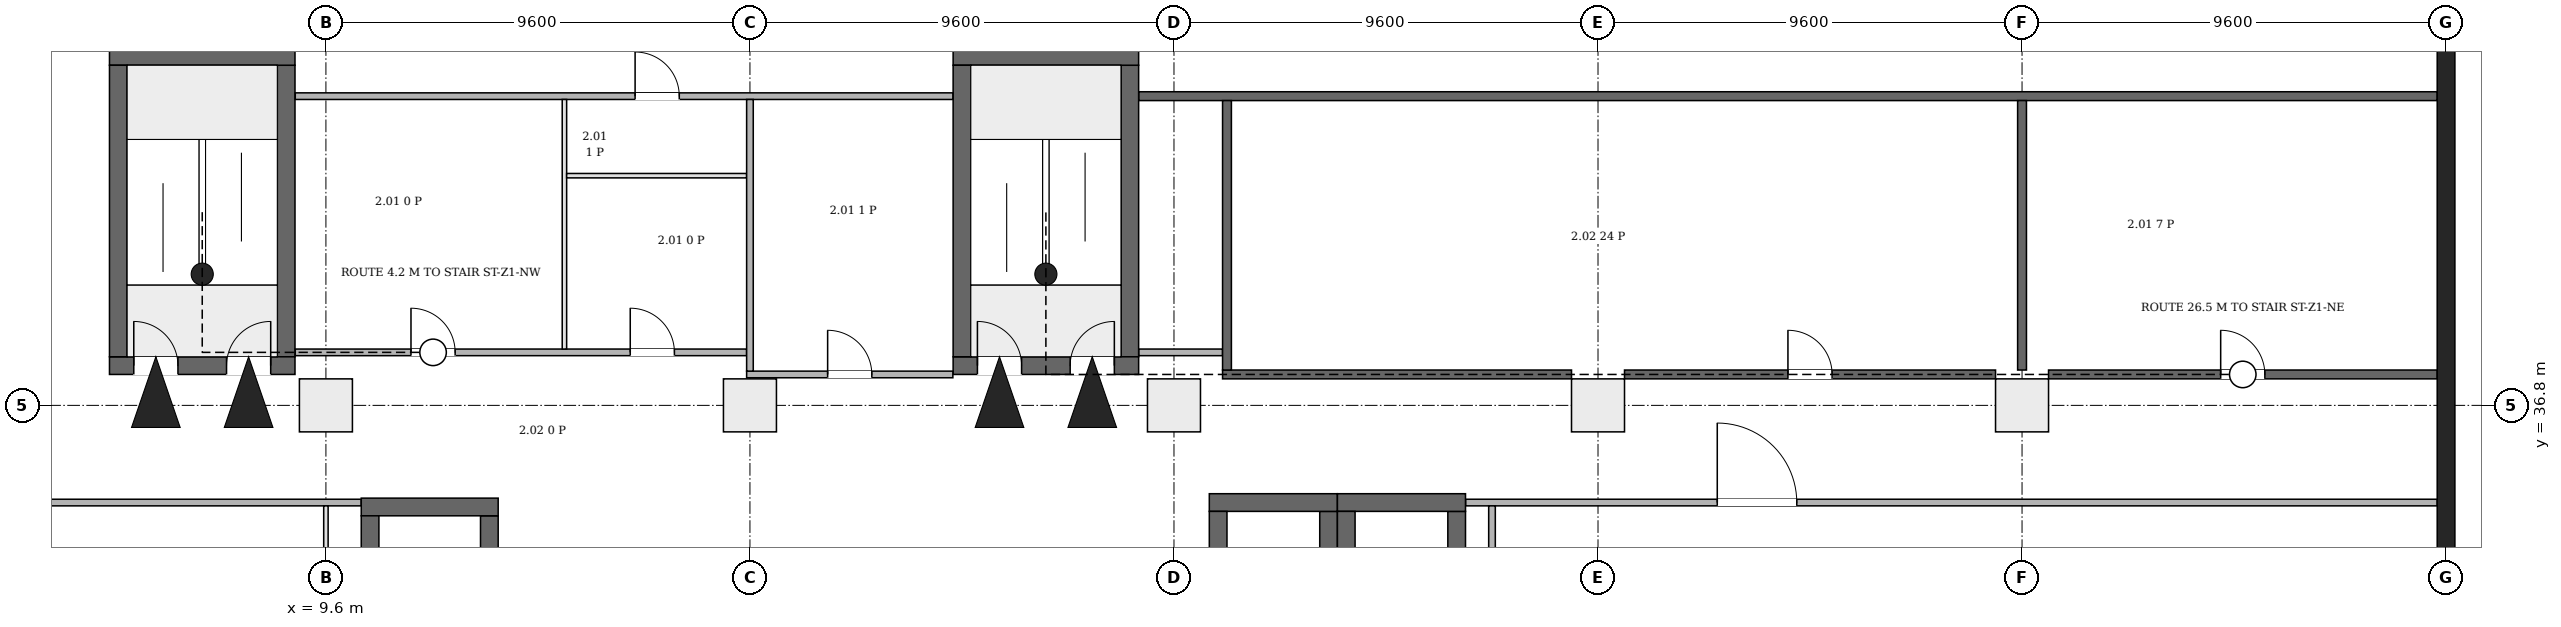
"""IFC4 building model, lengths in metres.
Left out: names, types, materials, properties, quantities, classifications, styles, units other than length and angle.
Written with IfcOpenShell. Run it as: python <this file> out.ifc"""

import sys

from ifc_helpers import new_model, si_unit, direction, frame, frame_2d, origin, origin_2d, place, context, subcontext, project, spatial, rectangle, extrude, element, fill, save


model = new_model("IFC4")
c1 = context("Model", 3, precision=1e-05, world=origin(), true_north=direction((0.0, 1.0)))
c2 = subcontext(c1, "Body", "Model", "MODEL_VIEW")
j1 = project(units=[si_unit("LENGTHUNIT", "METRE"), si_unit("PLANEANGLEUNIT", "RADIAN")], contexts=[c1])
p1 = place(None, origin())
s1 = spatial("IfcSite", under=j1, at=p1, CompositionType="ELEMENT")
p2 = place(p1, origin())
s2 = spatial("IfcBuilding", under=s1, at=p2, CompositionType="ELEMENT")
p3 = place(p2, frame((0.0, 0.0, 14.2)))
s3 = spatial("IfcBuildingStorey", under=s2, at=p3, CompositionType="ELEMENT", Elevation=14.2)
p4 = place(p3, frame((57.6, -0.2, 0.0), z_axis=(0.0, 0.0, 1.0), x_axis=(0.0, 1.0, 0.0)))
e1 = element("IfcWall", 1, at=p4, inside=s3, PredefinedType="SHEAR", context=c2, shape_type="SweptSolid", body=[
    extrude(rectangle(XDim=46.88, YDim=0.4, at=frame_2d((23.44, 0.0))), origin(), (0.0, 0.0, 1.0), 7.5),
])
p5 = place(p3, frame((4.7, 37.7, 0.0), z_axis=(0.0, 0.0, 1.0), x_axis=(1.0, 0.0, 0.0)))
e2 = element("IfcWall", 2, at=p5, inside=s3, PredefinedType="SHEAR", context=c2, shape_type="SweptSolid", body=[
    extrude(rectangle(XDim=4.2, YDim=0.4, at=frame_2d((2.1, 0.0))), origin(), (0.0, 0.0, 1.0), 7.5),
])
p6 = place(p5, frame((0.55, 0.0, 0.0)))
e3 = element("IfcOpeningElement", 3, at=p6, cuts=e2, PredefinedType="OPENING", context=c2, shape_type="SweptSolid", body=[
    extrude(rectangle(XDim=1.0, YDim=2.1, at=frame_2d((0.5, 1.05))), frame((0.0, 0.21, 0.0), z_axis=(0.0, -1.0, 0.0), x_axis=(1.0, 0.0, 0.0)), (0.0, 0.0, 1.0), 0.42),
])
p7 = place(p5, frame((2.65, 0.0, 0.0)))
e4 = element("IfcOpeningElement", 4, at=p7, cuts=e2, PredefinedType="OPENING", context=c2, shape_type="SweptSolid", body=[
    extrude(rectangle(XDim=1.0, YDim=2.1, at=frame_2d((0.5, 1.05))), frame((0.0, 0.21, 0.0), z_axis=(0.0, -1.0, 0.0), x_axis=(1.0, 0.0, 0.0)), (0.0, 0.0, 1.0), 0.42),
])
p8 = place(p3, frame((4.7, 44.7, 0.0), z_axis=(0.0, 0.0, 1.0), x_axis=(1.0, 0.0, 0.0)))
e5 = element("IfcWall", 5, at=p8, inside=s3, PredefinedType="SHEAR", context=c2, shape_type="SweptSolid", body=[
    extrude(rectangle(XDim=4.2, YDim=0.4, at=frame_2d((2.1, 0.0))), origin(), (0.0, 0.0, 1.0), 7.5),
])
for number, where, z_axis, x_axis in (
    (6, (4.9, 37.9, 0.0), (0.0, 0.0, 1.0), (0.0, 1.0, 0.0)),
    (7, (8.7, 37.9, 0.0), (0.0, 0.0, 1.0), (0.0, 1.0, 0.0)),
):
    element("IfcWall", number, at=place(p3, frame(where, z_axis=z_axis, x_axis=x_axis)), inside=s3, PredefinedType="SHEAR", context=c2, shape_type="SweptSolid", body=[
        extrude(rectangle(XDim=6.6, YDim=0.4, at=frame_2d((3.3, 0.0))), origin(), (0.0, 0.0, 1.0), 7.5),
    ])
p9 = place(p3, frame((23.8, 37.7, 0.0), z_axis=(0.0, 0.0, 1.0), x_axis=(1.0, 0.0, 0.0)))
e8 = element("IfcWall", 8, at=p9, inside=s3, PredefinedType="SHEAR", context=c2, shape_type="SweptSolid", body=[
    extrude(rectangle(XDim=4.2, YDim=0.4, at=frame_2d((2.1, 0.0))), origin(), (0.0, 0.0, 1.0), 7.5),
])
p10 = place(p9, frame((0.55, 0.0, 0.0)))
e9 = element("IfcOpeningElement", 9, at=p10, cuts=e8, PredefinedType="OPENING", context=c2, shape_type="SweptSolid", body=[
    extrude(rectangle(XDim=1.0, YDim=2.1, at=frame_2d((0.5, 1.05))), frame((0.0, 0.21, 0.0), z_axis=(0.0, -1.0, 0.0), x_axis=(1.0, 0.0, 0.0)), (0.0, 0.0, 1.0), 0.42),
])
p11 = place(p9, frame((2.65, 0.0, 0.0)))
e10 = element("IfcOpeningElement", 10, at=p11, cuts=e8, PredefinedType="OPENING", context=c2, shape_type="SweptSolid", body=[
    extrude(rectangle(XDim=1.0, YDim=2.1, at=frame_2d((0.5, 1.05))), frame((0.0, 0.21, 0.0), z_axis=(0.0, -1.0, 0.0), x_axis=(1.0, 0.0, 0.0)), (0.0, 0.0, 1.0), 0.42),
])
p12 = place(p3, frame((23.8, 44.7, 0.0), z_axis=(0.0, 0.0, 1.0), x_axis=(1.0, 0.0, 0.0)))
e11 = element("IfcWall", 11, at=p12, inside=s3, PredefinedType="SHEAR", context=c2, shape_type="SweptSolid", body=[
    extrude(rectangle(XDim=4.2, YDim=0.4, at=frame_2d((2.1, 0.0))), origin(), (0.0, 0.0, 1.0), 7.5),
])
for number, where, z_axis, x_axis in (
    (12, (24.0, 37.9, 0.0), (0.0, 0.0, 1.0), (0.0, 1.0, 0.0)),
    (13, (27.8, 37.9, 0.0), (0.0, 0.0, 1.0), (0.0, 1.0, 0.0)),
):
    element("IfcWall", number, at=place(p3, frame(where, z_axis=z_axis, x_axis=x_axis)), inside=s3, PredefinedType="SHEAR", context=c2, shape_type="SweptSolid", body=[
        extrude(rectangle(XDim=6.6, YDim=0.4, at=frame_2d((3.3, 0.0))), origin(), (0.0, 0.0, 1.0), 7.5),
    ])
p13 = place(p3, frame((10.4, 34.5, 0.0), z_axis=(0.0, 0.0, 1.0), x_axis=(1.0, 0.0, 0.0)))
e14 = element("IfcWall", 14, at=p13, inside=s3, PredefinedType="SHEAR", context=c2, shape_type="SweptSolid", body=[
    extrude(rectangle(XDim=3.1, YDim=0.4, at=frame_2d((1.55, 0.0))), origin(), (0.0, 0.0, 1.0), 7.5),
])
for number, where, z_axis, x_axis in (
    (15, (10.6, 30.9, 0.0), (0.0, 0.0, 1.0), (0.0, 1.0, 0.0)),
    (16, (13.3, 30.9, 0.0), (0.0, 0.0, 1.0), (0.0, 1.0, 0.0)),
):
    element("IfcWall", number, at=place(p3, frame(where, z_axis=z_axis, x_axis=x_axis)), inside=s3, PredefinedType="SHEAR", context=c2, shape_type="SweptSolid", body=[
        extrude(rectangle(XDim=3.4, YDim=0.4, at=frame_2d((1.7, 0.0))), origin(), (0.0, 0.0, 1.0), 7.5),
    ])
p14 = place(p3, frame((29.6, 34.6, 0.0), z_axis=(0.0, 0.0, 1.0), x_axis=(1.0, 0.0, 0.0)))
e17 = element("IfcWall", 17, at=p14, inside=s3, PredefinedType="SHEAR", context=c2, shape_type="SweptSolid", body=[
    extrude(rectangle(XDim=2.9, YDim=0.4, at=frame_2d((1.45, 0.0))), origin(), (0.0, 0.0, 1.0), 7.5),
])
for number, where, z_axis, x_axis in (
    (18, (29.8, 31.4, 0.0), (0.0, 0.0, 1.0), (0.0, 1.0, 0.0)),
    (19, (32.3, 31.4, 0.0), (0.0, 0.0, 1.0), (0.0, 1.0, 0.0)),
):
    element("IfcWall", number, at=place(p3, frame(where, z_axis=z_axis, x_axis=x_axis)), inside=s3, PredefinedType="SHEAR", context=c2, shape_type="SweptSolid", body=[
        extrude(rectangle(XDim=3.0, YDim=0.4, at=frame_2d((1.5, 0.0))), origin(), (0.0, 0.0, 1.0), 7.5),
    ])
p15 = place(p3, frame((32.5, 34.6, 0.0), z_axis=(0.0, 0.0, 1.0), x_axis=(1.0, 0.0, 0.0)))
e20 = element("IfcWall", 20, at=p15, inside=s3, PredefinedType="SHEAR", context=c2, shape_type="SweptSolid", body=[
    extrude(rectangle(XDim=2.9, YDim=0.4, at=frame_2d((1.45, 0.0))), origin(), (0.0, 0.0, 1.0), 7.5),
])
for number, where, z_axis, x_axis in (
    (21, (32.7, 31.4, 0.0), (0.0, 0.0, 1.0), (0.0, 1.0, 0.0)),
    (22, (35.2, 31.4, 0.0), (0.0, 0.0, 1.0), (0.0, 1.0, 0.0)),
):
    element("IfcWall", number, at=place(p3, frame(where, z_axis=z_axis, x_axis=x_axis)), inside=s3, PredefinedType="SHEAR", context=c2, shape_type="SweptSolid", body=[
        extrude(rectangle(XDim=3.0, YDim=0.4, at=frame_2d((1.5, 0.0))), origin(), (0.0, 0.0, 1.0), 7.5),
    ])
for number, where, z_axis, x_axis in (
    (23, (9.6, 36.8, 0.0), (0.0, 0.0, 1.0), (1.0, 0.0, 0.0)),
    (24, (19.2, 36.8, 0.0), (0.0, 0.0, 1.0), (1.0, 0.0, 0.0)),
    (25, (28.8, 36.8, 0.0), (0.0, 0.0, 1.0), (1.0, 0.0, 0.0)),
    (26, (38.4, 36.8, 0.0), (0.0, 0.0, 1.0), (1.0, 0.0, 0.0)),
    (27, (48.0, 36.8, 0.0), (0.0, 0.0, 1.0), (1.0, 0.0, 0.0)),
):
    element("IfcColumn", number, at=place(p3, frame(where, z_axis=z_axis, x_axis=x_axis)), inside=s3, PredefinedType="COLUMN", context=c2, shape_type="SweptSolid", body=[
        extrude(rectangle(XDim=1.2, YDim=1.2, at=origin_2d()), origin(), (0.0, 0.0, 1.0), 7.5),
    ])
p16 = place(p3, frame((2.706, 34.6, 0.0), z_axis=(0.0, 0.0, 1.0), x_axis=(1.0, 0.0, 0.0)))
e28 = element("IfcWall", 28, at=p16, inside=s3, PredefinedType="PARTITIONING", context=c2, shape_type="SweptSolid", body=[
    extrude(rectangle(XDim=7.688, YDim=0.15, at=frame_2d((3.844, 0.0))), origin(), (0.0, 0.0, 1.0), 7.15),
])
p17 = place(p3, frame((8.906, 38.0, 0.0), z_axis=(0.0, 0.0, 1.0), x_axis=(1.0, 0.0, 0.0)))
e29 = element("IfcWall", 29, at=p17, inside=s3, PredefinedType="PARTITIONING", context=c2, shape_type="SweptSolid", body=[
    extrude(rectangle(XDim=10.219, YDim=0.15, at=frame_2d((5.109, 0.0))), origin(), (0.0, 0.0, 1.0), 7.15),
])
p18 = place(p17, frame((2.62, 0.0, 0.0)))
e30 = element("IfcOpeningElement", 30, at=p18, cuts=e29, PredefinedType="OPENING", context=c2, shape_type="SweptSolid", body=[
    extrude(rectangle(XDim=1.0, YDim=2.1, at=frame_2d((0.5, 1.05))), frame((0.0, 0.085, 0.0), z_axis=(0.0, -1.0, 0.0), x_axis=(1.0, 0.0, 0.0)), (0.0, 0.0, 1.0), 0.17),
])
p19 = place(p17, frame((7.584, 0.0, 0.0)))
e31 = element("IfcOpeningElement", 31, at=p19, cuts=e29, PredefinedType="OPENING", context=c2, shape_type="SweptSolid", body=[
    extrude(rectangle(XDim=1.0, YDim=2.1, at=frame_2d((0.5, 1.05))), frame((0.0, 0.085, 0.0), z_axis=(0.0, -1.0, 0.0), x_axis=(1.0, 0.0, 0.0)), (0.0, 0.0, 1.0), 0.17),
])
p20 = place(p3, frame((8.906, 43.8, 0.0), z_axis=(0.0, 0.0, 1.0), x_axis=(1.0, 0.0, 0.0)))
e32 = element("IfcWall", 32, at=p20, inside=s3, PredefinedType="PARTITIONING", context=c2, shape_type="SweptSolid", body=[
    extrude(rectangle(XDim=14.888, YDim=0.15, at=frame_2d((7.444, 0.0))), origin(), (0.0, 0.0, 1.0), 7.15),
])
p21 = place(p20, frame((7.694, 0.0, 0.0)))
e33 = element("IfcOpeningElement", 33, at=p21, cuts=e32, PredefinedType="OPENING", context=c2, shape_type="SweptSolid", body=[
    extrude(rectangle(XDim=1.0, YDim=2.1, at=frame_2d((0.5, 1.05))), frame((0.0, 0.085, 0.0), z_axis=(0.0, -1.0, 0.0), x_axis=(1.0, 0.0, 0.0)), (0.0, 0.0, 1.0), 0.17),
])
p22 = place(p3, frame((9.6, 31.075, 0.0), z_axis=(0.0, 0.0, 1.0), x_axis=(0.0, 1.0, 0.0)))
e34 = element("IfcWall", 34, at=p22, inside=s3, PredefinedType="PARTITIONING", context=c2, shape_type="SweptSolid", body=[
    extrude(rectangle(XDim=3.45, YDim=0.1, at=frame_2d((1.725, 0.0))), origin(), (0.0, 0.0, 1.0), 6.75),
])
p23 = place(p3, frame((15.0, 38.075, 0.0), z_axis=(0.0, 0.0, 1.0), x_axis=(0.0, 1.0, 0.0)))
e35 = element("IfcWall", 35, at=p23, inside=s3, PredefinedType="PARTITIONING", context=c2, shape_type="SweptSolid", body=[
    extrude(rectangle(XDim=5.65, YDim=0.1, at=frame_2d((2.825, 0.0))), origin(), (0.0, 0.0, 1.0), 7.15),
])
p24 = place(p3, frame((15.05, 42.0, 0.0), z_axis=(0.0, 0.0, 1.0), x_axis=(1.0, 0.0, 0.0)))
e36 = element("IfcWall", 36, at=p24, inside=s3, PredefinedType="PARTITIONING", context=c2, shape_type="SweptSolid", body=[
    extrude(rectangle(XDim=4.075, YDim=0.1, at=frame_2d((2.038, 0.0))), origin(), (0.0, 0.0, 1.0), 7.15),
])
p25 = place(p3, frame((19.125, 37.5, 0.0), z_axis=(0.0, 0.0, 1.0), x_axis=(1.0, 0.0, 0.0)))
e37 = element("IfcWall", 37, at=p25, inside=s3, PredefinedType="PARTITIONING", context=c2, shape_type="SweptSolid", body=[
    extrude(rectangle(XDim=4.669, YDim=0.15, at=frame_2d((2.334, 0.0))), origin(), (0.0, 0.0, 1.0), 7.15),
])
p26 = place(p25, frame((1.834, 0.0, 0.0)))
e38 = element("IfcOpeningElement", 38, at=p26, cuts=e37, PredefinedType="OPENING", context=c2, shape_type="SweptSolid", body=[
    extrude(rectangle(XDim=1.0, YDim=2.1, at=frame_2d((0.5, 1.05))), frame((0.0, 0.085, 0.0), z_axis=(0.0, -1.0, 0.0), x_axis=(1.0, 0.0, 0.0)), (0.0, 0.0, 1.0), 0.17),
])
p27 = place(p3, frame((19.2, 37.575, 0.0), z_axis=(0.0, 0.0, 1.0), x_axis=(0.0, 1.0, 0.0)))
e39 = element("IfcWall", 39, at=p27, inside=s3, PredefinedType="PARTITIONING", context=c2, shape_type="SweptSolid", body=[
    extrude(rectangle(XDim=6.15, YDim=0.15, at=frame_2d((3.075, 0.0))), origin(), (0.0, 0.0, 1.0), 6.75),
])
p28 = place(p3, frame((28.006, 38.0, 0.0), z_axis=(0.0, 0.0, 1.0), x_axis=(1.0, 0.0, 0.0)))
e40 = element("IfcWall", 40, at=p28, inside=s3, PredefinedType="PARTITIONING", context=c2, shape_type="SweptSolid", body=[
    extrude(rectangle(XDim=1.894, YDim=0.15, at=frame_2d((0.947, 0.0))), origin(), (0.0, 0.0, 1.0), 7.15),
])
p29 = place(p3, frame((28.006, 43.8, 0.0), z_axis=(0.0, 0.0, 1.0), x_axis=(1.0, 0.0, 0.0)))
e41 = element("IfcWall", 41, at=p29, inside=s3, PredefinedType="PARTITIONING", context=c2, shape_type="SweptSolid", body=[
    extrude(rectangle(XDim=29.388, YDim=0.2, at=frame_2d((14.694, 0.0))), origin(), (0.0, 0.0, 1.0), 7.15),
])
p30 = place(p3, frame((29.9, 37.5, 0.0), z_axis=(0.0, 0.0, 1.0), x_axis=(1.0, 0.0, 0.0)))
e42 = element("IfcWall", 42, at=p30, inside=s3, PredefinedType="PARTITIONING", context=c2, shape_type="SweptSolid", body=[
    extrude(rectangle(XDim=7.9, YDim=0.2, at=frame_2d((3.95, 0.0))), origin(), (0.0, 0.0, 1.0), 7.15),
])
p31 = place(p3, frame((30.0, 37.6, 0.0), z_axis=(0.0, 0.0, 1.0), x_axis=(0.0, 1.0, 0.0)))
e43 = element("IfcWall", 43, at=p31, inside=s3, PredefinedType="PARTITIONING", context=c2, shape_type="SweptSolid", body=[
    extrude(rectangle(XDim=6.1, YDim=0.2, at=frame_2d((3.05, 0.0))), origin(), (0.0, 0.0, 1.0), 7.15),
])
p32 = place(p3, frame((35.406, 34.6, 0.0), z_axis=(0.0, 0.0, 1.0), x_axis=(1.0, 0.0, 0.0)))
e44 = element("IfcWall", 44, at=p32, inside=s3, PredefinedType="PARTITIONING", context=c2, shape_type="SweptSolid", body=[
    extrude(rectangle(XDim=21.988, YDim=0.15, at=frame_2d((10.994, 0.0))), origin(), (0.0, 0.0, 1.0), 7.15),
])
p33 = place(p32, frame((5.694, 0.0, 0.0)))
e45 = element("IfcOpeningElement", 45, at=p33, cuts=e44, PredefinedType="OPENING", context=c2, shape_type="SweptSolid", body=[
    extrude(rectangle(XDim=1.8, YDim=2.1, at=frame_2d((0.9, 1.05))), frame((0.0, 0.085, 0.0), z_axis=(0.0, -1.0, 0.0), x_axis=(1.0, 0.0, 0.0)), (0.0, 0.0, 1.0), 0.17),
])
p34 = place(p3, frame((36.0, 27.675, 0.0), z_axis=(0.0, 0.0, 1.0), x_axis=(0.0, 1.0, 0.0)))
e46 = element("IfcWall", 46, at=p34, inside=s3, PredefinedType="PARTITIONING", context=c2, shape_type="SweptSolid", body=[
    extrude(rectangle(XDim=6.85, YDim=0.15, at=frame_2d((3.425, 0.0))), origin(), (0.0, 0.0, 1.0), 7.15),
])
p35 = place(p3, frame((39.0, 37.5, 0.0), z_axis=(0.0, 0.0, 1.0), x_axis=(1.0, 0.0, 0.0)))
e47 = element("IfcWall", 47, at=p35, inside=s3, PredefinedType="PARTITIONING", context=c2, shape_type="SweptSolid", body=[
    extrude(rectangle(XDim=8.4, YDim=0.2, at=frame_2d((4.2, 0.0))), origin(), (0.0, 0.0, 1.0), 7.15),
])
p36 = place(p35, frame((3.7, 0.0, 0.0)))
e48 = element("IfcOpeningElement", 48, at=p36, cuts=e47, PredefinedType="OPENING", context=c2, shape_type="SweptSolid", body=[
    extrude(rectangle(XDim=1.0, YDim=2.1, at=frame_2d((0.5, 1.05))), frame((0.0, 0.11, 0.0), z_axis=(0.0, -1.0, 0.0), x_axis=(1.0, 0.0, 0.0)), (0.0, 0.0, 1.0), 0.22),
])
p37 = place(p3, frame((48.0, 37.6, 0.0), z_axis=(0.0, 0.0, 1.0), x_axis=(0.0, 1.0, 0.0)))
e49 = element("IfcWall", 49, at=p37, inside=s3, PredefinedType="PARTITIONING", context=c2, shape_type="SweptSolid", body=[
    extrude(rectangle(XDim=6.1, YDim=0.2, at=frame_2d((3.05, 0.0))), origin(), (0.0, 0.0, 1.0), 6.75),
])
p38 = place(p3, frame((48.6, 37.5, 0.0), z_axis=(0.0, 0.0, 1.0), x_axis=(1.0, 0.0, 0.0)))
e50 = element("IfcWall", 50, at=p38, inside=s3, PredefinedType="PARTITIONING", context=c2, shape_type="SweptSolid", body=[
    extrude(rectangle(XDim=8.794, YDim=0.2, at=frame_2d((4.397, 0.0))), origin(), (0.0, 0.0, 1.0), 7.15),
])
p39 = place(p38, frame((3.897, 0.0, 0.0)))
e51 = element("IfcOpeningElement", 51, at=p39, cuts=e50, PredefinedType="OPENING", context=c2, shape_type="SweptSolid", body=[
    extrude(rectangle(XDim=1.0, YDim=2.1, at=frame_2d((0.5, 1.05))), frame((0.0, 0.11, 0.0), z_axis=(0.0, -1.0, 0.0), x_axis=(1.0, 0.0, 0.0)), (0.0, 0.0, 1.0), 0.22),
])
p40 = place(p6, origin())
e52 = element("IfcDoor", 52, at=p40, inside=s3, OperationType="SINGLE_SWING_RIGHT", PredefinedType="DOOR", context=c2, shape_type="SweptSolid", body=[
    extrude(rectangle(XDim=1.0, YDim=2.1, at=frame_2d((0.5, 1.05))), frame((0.0, 0.025, 0.0), z_axis=(0.0, -1.0, 0.0), x_axis=(1.0, 0.0, 0.0)), (0.0, 0.0, 1.0), 0.05),
])
fill(e3, e52)
p41 = place(p7, origin())
e53 = element("IfcDoor", 53, at=p41, inside=s3, OperationType="SINGLE_SWING_LEFT", PredefinedType="DOOR", context=c2, shape_type="SweptSolid", body=[
    extrude(rectangle(XDim=1.0, YDim=2.1, at=frame_2d((0.5, 1.05))), frame((0.0, 0.025, 0.0), z_axis=(0.0, -1.0, 0.0), x_axis=(1.0, 0.0, 0.0)), (0.0, 0.0, 1.0), 0.05),
])
fill(e4, e53)
p42 = place(p10, origin())
e54 = element("IfcDoor", 54, at=p42, inside=s3, OperationType="SINGLE_SWING_RIGHT", PredefinedType="DOOR", context=c2, shape_type="SweptSolid", body=[
    extrude(rectangle(XDim=1.0, YDim=2.1, at=frame_2d((0.5, 1.05))), frame((0.0, 0.025, 0.0), z_axis=(0.0, -1.0, 0.0), x_axis=(1.0, 0.0, 0.0)), (0.0, 0.0, 1.0), 0.05),
])
fill(e9, e54)
p43 = place(p11, origin())
e55 = element("IfcDoor", 55, at=p43, inside=s3, OperationType="SINGLE_SWING_LEFT", PredefinedType="DOOR", context=c2, shape_type="SweptSolid", body=[
    extrude(rectangle(XDim=1.0, YDim=2.1, at=frame_2d((0.5, 1.05))), frame((0.0, 0.025, 0.0), z_axis=(0.0, -1.0, 0.0), x_axis=(1.0, 0.0, 0.0)), (0.0, 0.0, 1.0), 0.05),
])
fill(e10, e55)
p44 = place(p36, origin())
e56 = element("IfcDoor", 56, at=p44, inside=s3, OperationType="SINGLE_SWING_LEFT", PredefinedType="DOOR", context=c2, shape_type="SweptSolid", body=[
    extrude(rectangle(XDim=1.0, YDim=2.1, at=frame_2d((0.5, 1.05))), frame((0.0, 0.025, 0.0), z_axis=(0.0, -1.0, 0.0), x_axis=(1.0, 0.0, 0.0)), (0.0, 0.0, 1.0), 0.05),
])
fill(e48, e56)
p45 = place(p39, origin())
e57 = element("IfcDoor", 57, at=p45, inside=s3, OperationType="SINGLE_SWING_RIGHT", PredefinedType="DOOR", context=c2, shape_type="SweptSolid", body=[
    extrude(rectangle(XDim=1.0, YDim=2.1, at=frame_2d((0.5, 1.05))), frame((0.0, 0.025, 0.0), z_axis=(0.0, -1.0, 0.0), x_axis=(1.0, 0.0, 0.0)), (0.0, 0.0, 1.0), 0.05),
])
fill(e51, e57)
p46 = place(p26, origin())
e58 = element("IfcDoor", 58, at=p46, inside=s3, OperationType="SINGLE_SWING_LEFT", PredefinedType="DOOR", context=c2, shape_type="SweptSolid", body=[
    extrude(rectangle(XDim=1.0, YDim=2.1, at=frame_2d((0.5, 1.05))), frame((0.0, 0.025, 0.0), z_axis=(0.0, -1.0, 0.0), x_axis=(1.0, 0.0, 0.0)), (0.0, 0.0, 1.0), 0.05),
])
fill(e38, e58)
p47 = place(p18, origin())
e59 = element("IfcDoor", 59, at=p47, inside=s3, OperationType="SINGLE_SWING_LEFT", PredefinedType="DOOR", context=c2, shape_type="SweptSolid", body=[
    extrude(rectangle(XDim=1.0, YDim=2.1, at=frame_2d((0.5, 1.05))), frame((0.0, 0.025, 0.0), z_axis=(0.0, -1.0, 0.0), x_axis=(1.0, 0.0, 0.0)), (0.0, 0.0, 1.0), 0.05),
])
fill(e30, e59)
p48 = place(p19, origin())
e60 = element("IfcDoor", 60, at=p48, inside=s3, OperationType="SINGLE_SWING_RIGHT", PredefinedType="DOOR", context=c2, shape_type="SweptSolid", body=[
    extrude(rectangle(XDim=1.0, YDim=2.1, at=frame_2d((0.5, 1.05))), frame((0.0, 0.025, 0.0), z_axis=(0.0, -1.0, 0.0), x_axis=(1.0, 0.0, 0.0)), (0.0, 0.0, 1.0), 0.05),
])
fill(e31, e60)
p49 = place(p21, origin())
e61 = element("IfcDoor", 61, at=p49, inside=s3, OperationType="SINGLE_SWING_LEFT", PredefinedType="DOOR", context=c2, shape_type="SweptSolid", body=[
    extrude(rectangle(XDim=1.0, YDim=2.1, at=frame_2d((0.5, 1.05))), frame((0.0, 0.025, 0.0), z_axis=(0.0, -1.0, 0.0), x_axis=(1.0, 0.0, 0.0)), (0.0, 0.0, 1.0), 0.05),
])
fill(e33, e61)
p50 = place(p33, origin())
e62 = element("IfcDoor", 62, at=p50, inside=s3, OperationType="DOUBLE_DOOR_SINGLE_SWING", PredefinedType="DOOR", context=c2, shape_type="SweptSolid", body=[
    extrude(rectangle(XDim=1.8, YDim=2.1, at=frame_2d((0.9, 1.05))), frame((0.0, 0.025, 0.0), z_axis=(0.0, -1.0, 0.0), x_axis=(1.0, 0.0, 0.0)), (0.0, 0.0, 1.0), 0.05),
])
fill(e45, e62)
save(model, sys.argv[1])
